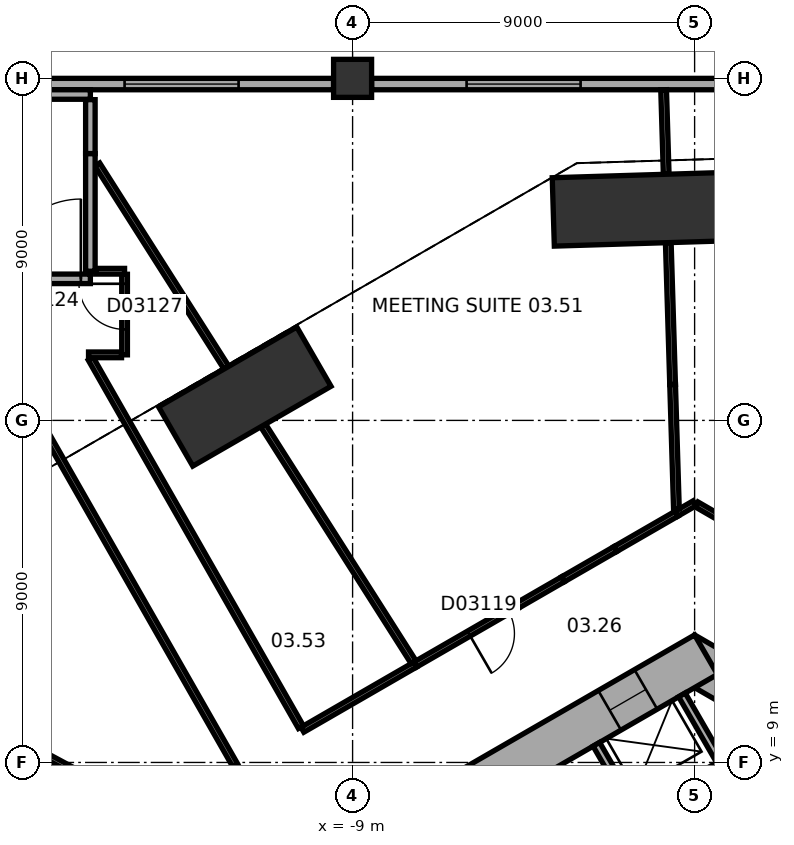
"""IFC4 building model, lengths in metres.
Left out: names, types, materials, properties, quantities, classifications, styles, units other than length and angle.
Written with IfcOpenShell. Run it as: python <this file> out.ifc"""

import sys

from ifc_helpers import new_model, si_unit, direction, frame, frame_2d, origin, origin_2d, place, context, subcontext, project, spatial, rectangle, extrude, element, fill, save


model = new_model("IFC4")
c1 = context("Model", 3, precision=1e-05, world=origin(), true_north=direction((0.0, 1.0)))
c2 = subcontext(c1, "Body", "Model", "MODEL_VIEW")
j1 = project(units=[si_unit("LENGTHUNIT", "METRE"), si_unit("PLANEANGLEUNIT", "RADIAN")], contexts=[c1])
p1 = place(None, origin())
s1 = spatial("IfcSite", under=j1, at=p1, CompositionType="ELEMENT")
p2 = place(p1, origin())
s2 = spatial("IfcBuilding", under=s1, at=p2, CompositionType="ELEMENT")
p3 = place(p2, frame((0.0, 0.0, 21.0)))
s3 = spatial("IfcBuildingStorey", under=s2, at=p3, CompositionType="ELEMENT", Elevation=21.0)
p4 = place(p3, frame((-0.72, 23.577, 0.0), z_axis=(0.0, 0.0, 1.0), x_axis=(-0.999533644135, -0.030536768695, 0.0)))
e1 = element("IfcColumn", 1, at=p4, inside=s3, PredefinedType="COLUMN", context=c2, shape_type="SweptSolid", body=[
    extrude(rectangle(XDim=6.0, YDim=1.8, at=origin_2d()), origin(), (0.0, 0.0, 1.0), 8.0),
])
p5 = place(p3, frame((-11.837, 18.627, 0.0), z_axis=(0.0, 0.0, 1.0), x_axis=(-0.866028021766, -0.499995465495, 0.0)))
e2 = element("IfcColumn", 2, at=p5, inside=s3, PredefinedType="COLUMN", context=c2, shape_type="SweptSolid", body=[
    extrude(rectangle(XDim=4.2, YDim=1.8, at=origin_2d()), origin(), (0.0, 0.0, 1.0), 8.0),
])
p6 = place(p3, frame((-9.0, 27.0, 0.0), z_axis=(0.0, 0.0, 1.0), x_axis=(1.0, 0.0, 0.0)))
e3 = element("IfcColumn", 3, at=p6, inside=s3, PredefinedType="COLUMN", context=c2, shape_type="SweptSolid", body=[
    extrude(rectangle(XDim=1.0, YDim=1.0, at=origin_2d()), origin(), (0.0, 0.0, 1.0), 8.0),
])
p7 = place(p3, frame((10.4, 5.658, 0.0), z_axis=(0.0, 0.0, 1.0), x_axis=(-0.866021384402, 0.500006961711, 0.0)))
e4 = element("IfcWall", 4, at=p7, inside=s3, PredefinedType="SHEAR", context=c2, shape_type="SweptSolid", body=[
    extrude(rectangle(XDim=12.355, YDim=1.2, at=frame_2d((6.178, 0.0))), origin(), (0.0, 0.0, 1.0), 8.0),
])
p8 = place(p7, frame((2.728, 0.0, 0.0)))
e5 = element("IfcOpeningElement", 5, at=p8, cuts=e4, PredefinedType="OPENING", context=c2, shape_type="SweptSolid", body=[
    extrude(rectangle(XDim=1.1, YDim=2.1, at=frame_2d((0.55, 1.05))), frame((0.0, 0.61, 0.0), z_axis=(0.0, -1.0, 0.0), x_axis=(1.0, 0.0, 0.0)), (0.0, 0.0, 1.0), 1.22),
])
p9 = place(p7, frame((5.328, 0.0, 0.0)))
e6 = element("IfcOpeningElement", 6, at=p9, cuts=e4, PredefinedType="OPENING", context=c2, shape_type="SweptSolid", body=[
    extrude(rectangle(XDim=1.1, YDim=2.1, at=frame_2d((0.55, 1.05))), frame((0.0, 0.61, 0.0), z_axis=(0.0, -1.0, 0.0), x_axis=(1.0, 0.0, 0.0)), (0.0, 0.0, 1.0), 1.22),
])
p10 = place(p7, frame((7.928, 0.0, 0.0)))
e7 = element("IfcOpeningElement", 7, at=p10, cuts=e4, PredefinedType="OPENING", context=c2, shape_type="SweptSolid", body=[
    extrude(rectangle(XDim=1.1, YDim=2.1, at=frame_2d((0.55, 1.05))), frame((0.0, 0.61, 0.0), z_axis=(0.0, -1.0, 0.0), x_axis=(1.0, 0.0, 0.0)), (0.0, 0.0, 1.0), 1.22),
])
p11 = place(p3, frame((0.3, 11.836, 0.0), z_axis=(0.0, 0.0, 1.0), x_axis=(-0.866021384402, -0.500006961711, 0.0)))
e8 = element("IfcWall", 8, at=p11, inside=s3, PredefinedType="SHEAR", context=c2, shape_type="SweptSolid", body=[
    extrude(rectangle(XDim=12.355, YDim=1.2, at=frame_2d((6.178, 0.0))), origin(), (0.0, 0.0, 1.0), 8.0),
])
p12 = place(p11, frame((6.378, 0.0, 0.0)))
e9 = element("IfcOpeningElement", 9, at=p12, cuts=e8, PredefinedType="OPENING", context=c2, shape_type="SweptSolid", body=[
    extrude(rectangle(XDim=1.5, YDim=2.1, at=frame_2d((0.75, 1.05))), frame((0.0, 0.61, 0.0), z_axis=(0.0, -1.0, 0.0), x_axis=(1.0, 0.0, 0.0)), (0.0, 0.0, 1.0), 1.22),
])
p13 = place(p11, frame((1.828, 0.0, 0.0)))
e10 = element("IfcOpeningElement", 10, at=p13, cuts=e8, PredefinedType="OPENING", context=c2, shape_type="SweptSolid", body=[
    extrude(rectangle(XDim=1.1, YDim=2.1, at=frame_2d((0.55, 1.05))), frame((0.0, 0.61, 0.0), z_axis=(0.0, -1.0, 0.0), x_axis=(1.0, 0.0, 0.0)), (0.0, 0.0, 1.0), 1.22),
])
p14 = place(p3, frame((8.5, 26.85, 0.0), z_axis=(0.0, 0.0, 1.0), x_axis=(-1.0, 0.0, 0.0)))
e11 = element("IfcWall", 11, at=p14, inside=s3, PredefinedType="STANDARD", context=c2, shape_type="SweptSolid", body=[
    extrude(rectangle(XDim=17.0, YDim=0.3, at=frame_2d((8.5, 0.0))), origin(), (0.0, 0.0, 1.0), 6.5),
])
p15 = place(p14, frame((2.5, 0.0, 1.0)))
e12 = element("IfcOpeningElement", 12, at=p15, cuts=e11, PredefinedType="OPENING", context=c2, shape_type="SweptSolid", body=[
    extrude(rectangle(XDim=3.0, YDim=4.0, at=frame_2d((1.5, 2.0))), frame((0.0, 0.16, 0.0), z_axis=(0.0, -1.0, 0.0), x_axis=(1.0, 0.0, 0.0)), (0.0, 0.0, 1.0), 0.32),
])
p16 = place(p14, frame((11.5, 0.0, 1.0)))
e13 = element("IfcOpeningElement", 13, at=p16, cuts=e11, PredefinedType="OPENING", context=c2, shape_type="SweptSolid", body=[
    extrude(rectangle(XDim=3.0, YDim=4.0, at=frame_2d((1.5, 2.0))), frame((0.0, 0.16, 0.0), z_axis=(0.0, -1.0, 0.0), x_axis=(1.0, 0.0, 0.0)), (0.0, 0.0, 1.0), 0.32),
])
p17 = place(p3, frame((-9.5, 26.85, 0.0), z_axis=(0.0, 0.0, 1.0), x_axis=(-1.0, 0.0, 0.0)))
e14 = element("IfcWall", 14, at=p17, inside=s3, PredefinedType="STANDARD", context=c2, shape_type="SweptSolid", body=[
    extrude(rectangle(XDim=17.0, YDim=0.3, at=frame_2d((8.5, 0.0))), origin(), (0.0, 0.0, 1.0), 6.5),
])
p18 = place(p17, frame((2.5, 0.0, 1.0)))
e15 = element("IfcOpeningElement", 15, at=p18, cuts=e14, PredefinedType="OPENING", context=c2, shape_type="SweptSolid", body=[
    extrude(rectangle(XDim=3.0, YDim=4.0, at=frame_2d((1.5, 2.0))), frame((0.0, 0.16, 0.0), z_axis=(0.0, -1.0, 0.0), x_axis=(1.0, 0.0, 0.0)), (0.0, 0.0, 1.0), 0.32),
])
p19 = place(p17, frame((11.5, 0.0, 1.0)))
e16 = element("IfcOpeningElement", 16, at=p19, cuts=e14, PredefinedType="OPENING", context=c2, shape_type="SweptSolid", body=[
    extrude(rectangle(XDim=3.0, YDim=4.0, at=frame_2d((1.5, 2.0))), frame((0.0, 0.16, 0.0), z_axis=(0.0, -1.0, 0.0), x_axis=(1.0, 0.0, 0.0)), (0.0, 0.0, 1.0), 0.32),
])
p20 = place(p3, frame((0.532, 8.122, 0.0), z_axis=(0.0, 0.0, 1.0), x_axis=(0.500077893725, 0.86598042715, 0.0)))
e17 = element("IfcWall", 17, at=p20, inside=s3, PredefinedType="PARTITIONING", context=c2, shape_type="SweptSolid", body=[
    extrude(rectangle(XDim=2.2, YDim=0.2, at=frame_2d((1.1, 0.0))), origin(), (0.0, 0.0, 1.0), 7.7),
])
p21 = place(p3, frame((0.803, 9.009, 0.0), z_axis=(0.0, 0.0, 1.0), x_axis=(-0.866028230842, -0.499995103361, 0.0)))
e18 = element("IfcWall", 18, at=p21, inside=s3, PredefinedType="PARTITIONING", context=c2, shape_type="SweptSolid", body=[
    extrude(rectangle(XDim=5.4, YDim=0.2, at=frame_2d((2.7, 0.0))), origin(), (0.0, 0.0, 1.0), 7.7),
])
p22 = place(p3, frame((0.767, 8.872, 0.0), z_axis=(0.0, 0.0, 1.0), x_axis=(-0.499994660107, 0.866028486751, 0.0)))
e19 = element("IfcWall", 19, at=p22, inside=s3, PredefinedType="PARTITIONING", context=c2, shape_type="SweptSolid", body=[
    extrude(rectangle(XDim=2.2, YDim=0.2, at=frame_2d((1.1, 0.0))), origin(), (0.0, 0.0, 1.0), 7.7),
])
p23 = place(p3, frame((-1.485, 7.572, 0.0), z_axis=(0.0, 0.0, 1.0), x_axis=(-0.50002983664, 0.866008176907, 0.0)))
e20 = element("IfcWall", 20, at=p23, inside=s3, PredefinedType="PARTITIONING", context=c2, shape_type="SweptSolid", body=[
    extrude(rectangle(XDim=2.2, YDim=0.2, at=frame_2d((1.1, 0.0))), origin(), (0.0, 0.0, 1.0), 7.7),
])
p24 = place(p3, frame((-13.806, 7.418, 0.0), z_axis=(0.0, 0.0, 1.0), x_axis=(-0.880891557551, 0.473318142305, 0.0)))
e21 = element("IfcWall", 21, at=p24, inside=s3, PredefinedType="PARTITIONING", context=c2, shape_type="SweptSolid", body=[
    extrude(rectangle(XDim=7.787, YDim=0.15, at=frame_2d((3.894, 0.0))), origin(), (0.0, 0.0, 1.0), 7.7),
])
p25 = place(p3, frame((-12.092, 8.93, 0.0), z_axis=(0.0, 0.0, 1.0), x_axis=(-0.495564220718, 0.868571299977, 0.0)))
e22 = element("IfcWall", 22, at=p25, inside=s3, PredefinedType="PARTITIONING", context=c2, shape_type="SweptSolid", body=[
    extrude(rectangle(XDim=11.988, YDim=0.15, at=frame_2d((5.994, 0.0))), origin(), (0.0, 0.0, 1.0), 7.7),
])
p26 = place(p3, frame((-10.321, 9.861, 0.0), z_axis=(0.0, 0.0, 1.0), x_axis=(0.865970719175, 0.500094704563, 0.0)))
e23 = element("IfcWall", 23, at=p26, inside=s3, PredefinedType="PARTITIONING", context=c2, shape_type="SweptSolid", body=[
    extrude(rectangle(XDim=3.425, YDim=0.15, at=frame_2d((1.712, 0.0))), origin(), (0.0, 0.0, 1.0), 7.7),
])
p27 = place(p3, frame((-7.354, 11.573, 0.0), z_axis=(0.0, 0.0, 1.0), x_axis=(0.866051051954, 0.499955573435, 0.0)))
e24 = element("IfcWall", 24, at=p27, inside=s3, PredefinedType="PARTITIONING", context=c2, shape_type="SweptSolid", body=[
    extrude(rectangle(XDim=3.082, YDim=0.15, at=frame_2d((1.541, 0.0))), origin(), (0.0, 0.0, 1.0), 7.7),
])
p28 = place(p27, frame((1.632, 0.0, 0.0)))
e25 = element("IfcOpeningElement", 25, at=p28, cuts=e24, PredefinedType="OPENING", context=c2, shape_type="SweptSolid", body=[
    extrude(rectangle(XDim=1.2, YDim=2.1, at=frame_2d((0.6, 1.05))), frame((0.0, 0.085, 0.0), z_axis=(0.0, -1.0, 0.0), x_axis=(1.0, 0.0, 0.0)), (0.0, 0.0, 1.0), 0.17),
])
p29 = place(p3, frame((-7.397, 11.641, 0.0), z_axis=(0.0, 0.0, 1.0), x_axis=(-0.536312130721, 0.844019726334, 0.0)))
e26 = element("IfcWall", 26, at=p29, inside=s3, PredefinedType="PARTITIONING", context=c2, shape_type="SweptSolid", body=[
    extrude(rectangle(XDim=7.376, YDim=0.15, at=frame_2d((3.688, 0.0))), origin(), (0.0, 0.0, 1.0), 7.7),
])
p30 = place(p3, frame((-3.46, 13.822, 0.0), z_axis=(0.0, 0.0, 1.0), x_axis=(-0.866004557827, -0.500036104519, 0.0)))
e27 = element("IfcWall", 27, at=p30, inside=s3, PredefinedType="PARTITIONING", context=c2, shape_type="SweptSolid", body=[
    extrude(rectangle(XDim=1.415, YDim=0.15, at=frame_2d((0.708, 0.0))), origin(), (0.0, 0.0, 1.0), 7.7),
])
p31 = place(p3, frame((3.386, 13.865, 0.0), z_axis=(0.0, 0.0, 1.0), x_axis=(-0.866006051527, 0.500033517596, 0.0)))
e28 = element("IfcWall", 28, at=p31, inside=s3, PredefinedType="PARTITIONING", context=c2, shape_type="SweptSolid", body=[
    extrude(rectangle(XDim=3.85, YDim=0.15, at=frame_2d((1.925, 0.0))), origin(), (0.0, 0.0, 1.0), 7.7),
])
p32 = place(p3, frame((-2.087, 14.615, 0.0), z_axis=(0.0, 0.0, 1.0), x_axis=(-0.866054784643, -0.499949107407, 0.0)))
e29 = element("IfcWall", 29, at=p32, inside=s3, PredefinedType="PARTITIONING", context=c2, shape_type="SweptSolid", body=[
    extrude(rectangle(XDim=1.585, YDim=0.15, at=frame_2d((0.792, 0.0))), origin(), (0.0, 0.0, 1.0), 7.7),
])
p33 = place(p3, frame((-2.087, 14.615, 0.0), z_axis=(0.0, 0.0, 1.0), x_axis=(0.866006459158, 0.500032811619, 0.0)))
e30 = element("IfcWall", 30, at=p33, inside=s3, PredefinedType="PARTITIONING", context=c2, shape_type="SweptSolid", body=[
    extrude(rectangle(XDim=1.861, YDim=0.15, at=frame_2d((0.931, 0.0))), origin(), (0.0, 0.0, 1.0), 7.7),
])
p34 = place(p3, frame((-0.475, 15.545, 0.0), z_axis=(0.0, 0.0, 1.0), x_axis=(0.865933599817, 0.500158975434, 0.0)))
e31 = element("IfcWall", 31, at=p34, inside=s3, PredefinedType="PARTITIONING", context=c2, shape_type="SweptSolid", body=[
    extrude(rectangle(XDim=0.549, YDim=0.15, at=frame_2d((0.274, 0.0))), origin(), (0.0, 0.0, 1.0), 7.7),
])
p35 = place(p3, frame((-0.579, 18.946, 0.0), z_axis=(0.0, 0.0, 1.0), x_axis=(0.030572886356, -0.999532540051, 0.0)))
e32 = element("IfcWall", 32, at=p35, inside=s3, PredefinedType="PARTITIONING", context=c2, shape_type="SweptSolid", body=[
    extrude(rectangle(XDim=3.282, YDim=0.15, at=frame_2d((1.641, 0.0))), origin(), (0.0, 0.0, 1.0), 7.7),
])
p36 = place(p3, frame((-0.579, 18.946, 0.0), z_axis=(0.0, 0.0, 1.0), x_axis=(-0.030471255388, 0.999535643484, 0.0)))
e33 = element("IfcWall", 33, at=p36, inside=s3, PredefinedType="PARTITIONING", context=c2, shape_type="SweptSolid", body=[
    extrude(rectangle(XDim=3.734, YDim=0.15, at=frame_2d((1.867, 0.0))), origin(), (0.0, 0.0, 1.0), 7.7),
])
p37 = place(p3, frame((-12.32, 19.387, 0.0), z_axis=(0.0, 0.0, 1.0), x_axis=(-0.536309341483, 0.844021498682, 0.0)))
e34 = element("IfcWall", 34, at=p37, inside=s3, PredefinedType="PARTITIONING", context=c2, shape_type="SweptSolid", body=[
    extrude(rectangle(XDim=6.335, YDim=0.15, at=frame_2d((3.168, 0.0))), origin(), (0.0, 0.0, 1.0), 7.7),
])
p38 = place(p3, frame((-15.889, 19.621, 0.0), z_axis=(0.0, 0.0, 1.0), x_axis=(0.495540263005, -0.868584968636, 0.0)))
e35 = element("IfcWall", 35, at=p38, inside=s3, PredefinedType="PARTITIONING", context=c2, shape_type="SweptSolid", body=[
    extrude(rectangle(XDim=11.157, YDim=0.15, at=frame_2d((5.579, 0.0))), origin(), (0.0, 0.0, 1.0), 7.7),
])
p39 = place(p3, frame((-15.08, 19.725, 0.0), z_axis=(0.0, 0.0, 1.0), x_axis=(-1.0, 0.0, 0.0)))
e36 = element("IfcWall", 36, at=p39, inside=s3, PredefinedType="PARTITIONING", context=c2, shape_type="SweptSolid", body=[
    extrude(rectangle(XDim=0.868, YDim=0.15, at=frame_2d((0.434, 0.0))), origin(), (0.0, 0.0, 1.0), 7.7),
])
p40 = place(p3, frame((-15.9, 21.725, 0.0), z_axis=(0.0, 0.0, 1.0), x_axis=(-1.0, 0.0, 0.0)))
e37 = element("IfcWall", 37, at=p40, inside=s3, PredefinedType="SOLIDWALL", context=c2, shape_type="SweptSolid", body=[
    extrude(rectangle(XDim=3.3, YDim=0.25, at=frame_2d((1.65, 0.0))), origin(), (0.0, 0.0, 1.0), 7.7),
])
p41 = place(p40, frame((0.25, 0.0, 0.0)))
e38 = element("IfcOpeningElement", 38, at=p41, cuts=e37, PredefinedType="OPENING", context=c2, shape_type="SweptSolid", body=[
    extrude(rectangle(XDim=2.1, YDim=2.4, at=frame_2d((1.05, 1.2))), frame((0.0, 0.135, 0.0), z_axis=(0.0, -1.0, 0.0), x_axis=(1.0, 0.0, 0.0)), (0.0, 0.0, 1.0), 0.27),
])
p42 = place(p3, frame((-15.0, 21.845, 0.0), z_axis=(0.0, 0.0, 1.0), x_axis=(0.0, -1.0, 0.0)))
e39 = element("IfcWall", 39, at=p42, inside=s3, PredefinedType="PARTITIONING", context=c2, shape_type="SweptSolid", body=[
    extrude(rectangle(XDim=2.12, YDim=0.15, at=frame_2d((1.06, 0.0))), origin(), (0.0, 0.0, 1.0), 7.7),
])
p43 = place(p42, frame((0.25, 0.0, 0.0)))
e40 = element("IfcOpeningElement", 40, at=p43, cuts=e39, PredefinedType="OPENING", context=c2, shape_type="SweptSolid", body=[
    extrude(rectangle(XDim=1.2, YDim=2.1, at=frame_2d((0.6, 1.05))), frame((0.0, 0.085, 0.0), z_axis=(0.0, -1.0, 0.0), x_axis=(1.0, 0.0, 0.0)), (0.0, 0.0, 1.0), 0.17),
])
p44 = place(p3, frame((-15.76, 21.925, 0.0), z_axis=(0.0, 0.0, 1.0), x_axis=(1.0, 0.0, 0.0)))
e41 = element("IfcWall", 41, at=p44, inside=s3, PredefinedType="PARTITIONING", context=c2, shape_type="SweptSolid", body=[
    extrude(rectangle(XDim=0.76, YDim=0.15, at=frame_2d((0.38, 0.0))), origin(), (0.0, 0.0, 1.0), 7.7),
])
p45 = place(p3, frame((-0.748, 24.477, 0.0), z_axis=(0.0, 0.0, 1.0), x_axis=(-0.030405439098, 0.999537647752, 0.0)))
e42 = element("IfcWall", 42, at=p45, inside=s3, PredefinedType="PARTITIONING", context=c2, shape_type="SweptSolid", body=[
    extrude(rectangle(XDim=2.224, YDim=0.15, at=frame_2d((1.112, 0.0))), origin(), (0.0, 0.0, 1.0), 7.7),
])
p46 = place(p3, frame((-15.9, 25.021, 0.0), z_axis=(0.0, 0.0, 1.0), x_axis=(0.0, -1.0, 0.0)))
e43 = element("IfcWall", 43, at=p46, inside=s3, PredefinedType="SOLIDWALL", context=c2, shape_type="SweptSolid", body=[
    extrude(rectangle(XDim=3.096, YDim=0.25, at=frame_2d((1.548, 0.0))), origin(), (0.0, 0.0, 1.0), 7.7),
])
p47 = place(p3, frame((-15.9, 26.44, 0.0), z_axis=(0.0, 0.0, 1.0), x_axis=(0.0, -1.0, 0.0)))
e44 = element("IfcWall", 44, at=p47, inside=s3, PredefinedType="SOLIDWALL", context=c2, shape_type="SweptSolid", body=[
    extrude(rectangle(XDim=1.418, YDim=0.25, at=frame_2d((0.709, 0.0))), origin(), (0.0, 0.0, 1.0), 7.7),
])
p48 = place(p3, frame((-26.45, 26.575, 0.0), z_axis=(0.0, 0.0, 1.0), x_axis=(1.0, 0.0, 0.0)))
e45 = element("IfcWall", 45, at=p48, inside=s3, PredefinedType="SOLIDWALL", context=c2, shape_type="SweptSolid", body=[
    extrude(rectangle(XDim=10.55, YDim=0.25, at=frame_2d((5.275, 0.0))), origin(), (0.0, 0.0, 1.0), 7.7),
])
p49 = place(p16, origin())
e46 = element("IfcWindow", 46, at=p49, inside=s3, PartitioningType="SINGLE_PANEL", PredefinedType="WINDOW", context=c2, shape_type="SweptSolid", body=[
    extrude(rectangle(XDim=3.0, YDim=4.0, at=frame_2d((1.5, 2.0))), frame((0.0, 0.03, 0.0), z_axis=(0.0, -1.0, 0.0), x_axis=(1.0, 0.0, 0.0)), (0.0, 0.0, 1.0), 0.06),
])
fill(e13, e46)
p50 = place(p18, origin())
e47 = element("IfcWindow", 47, at=p50, inside=s3, PartitioningType="SINGLE_PANEL", PredefinedType="WINDOW", context=c2, shape_type="SweptSolid", body=[
    extrude(rectangle(XDim=3.0, YDim=4.0, at=frame_2d((1.5, 2.0))), frame((0.0, 0.03, 0.0), z_axis=(0.0, -1.0, 0.0), x_axis=(1.0, 0.0, 0.0)), (0.0, 0.0, 1.0), 0.06),
])
fill(e15, e47)
p51 = place(p13, origin())
e48 = element("IfcDoor", 48, at=p51, inside=s3, OperationType="DOUBLE_DOOR_SLIDING", PredefinedType="DOOR", context=c2, shape_type="SweptSolid", body=[
    extrude(rectangle(XDim=1.1, YDim=2.1, at=frame_2d((0.55, 1.05))), frame((0.0, 0.025, 0.0), z_axis=(0.0, -1.0, 0.0), x_axis=(1.0, 0.0, 0.0)), (0.0, 0.0, 1.0), 0.05),
])
fill(e10, e48)
p52 = place(p28, origin())
e49 = element("IfcDoor", 49, at=p52, inside=s3, OperationType="SINGLE_SWING_LEFT", PredefinedType="DOOR", context=c2, shape_type="SweptSolid", body=[
    extrude(rectangle(XDim=1.2, YDim=2.1, at=frame_2d((0.6, 1.05))), frame((0.0, 0.025, 0.0), z_axis=(0.0, -1.0, 0.0), x_axis=(1.0, 0.0, 0.0)), (0.0, 0.0, 1.0), 0.05),
])
fill(e25, e49)
p53 = place(p41, frame((2.1, 0.0, 0.0), z_axis=(0.0, 0.0, 1.0), x_axis=(-1.0, 0.0, 0.0)))
e50 = element("IfcDoor", 50, at=p53, inside=s3, OperationType="DOUBLE_DOOR_SINGLE_SWING", PredefinedType="DOOR", context=c2, shape_type="SweptSolid", body=[
    extrude(rectangle(XDim=2.1, YDim=2.4, at=frame_2d((1.05, 1.2))), frame((0.0, 0.025, 0.0), z_axis=(0.0, -1.0, 0.0), x_axis=(1.0, 0.0, 0.0)), (0.0, 0.0, 1.0), 0.05),
])
fill(e38, e50)
p54 = place(p43, origin())
e51 = element("IfcDoor", 51, at=p54, inside=s3, OperationType="SINGLE_SWING_LEFT", PredefinedType="DOOR", context=c2, shape_type="SweptSolid", body=[
    extrude(rectangle(XDim=1.2, YDim=2.1, at=frame_2d((0.6, 1.05))), frame((0.0, 0.025, 0.0), z_axis=(0.0, -1.0, 0.0), x_axis=(1.0, 0.0, 0.0)), (0.0, 0.0, 1.0), 0.05),
])
fill(e40, e51)
save(model, sys.argv[1])
